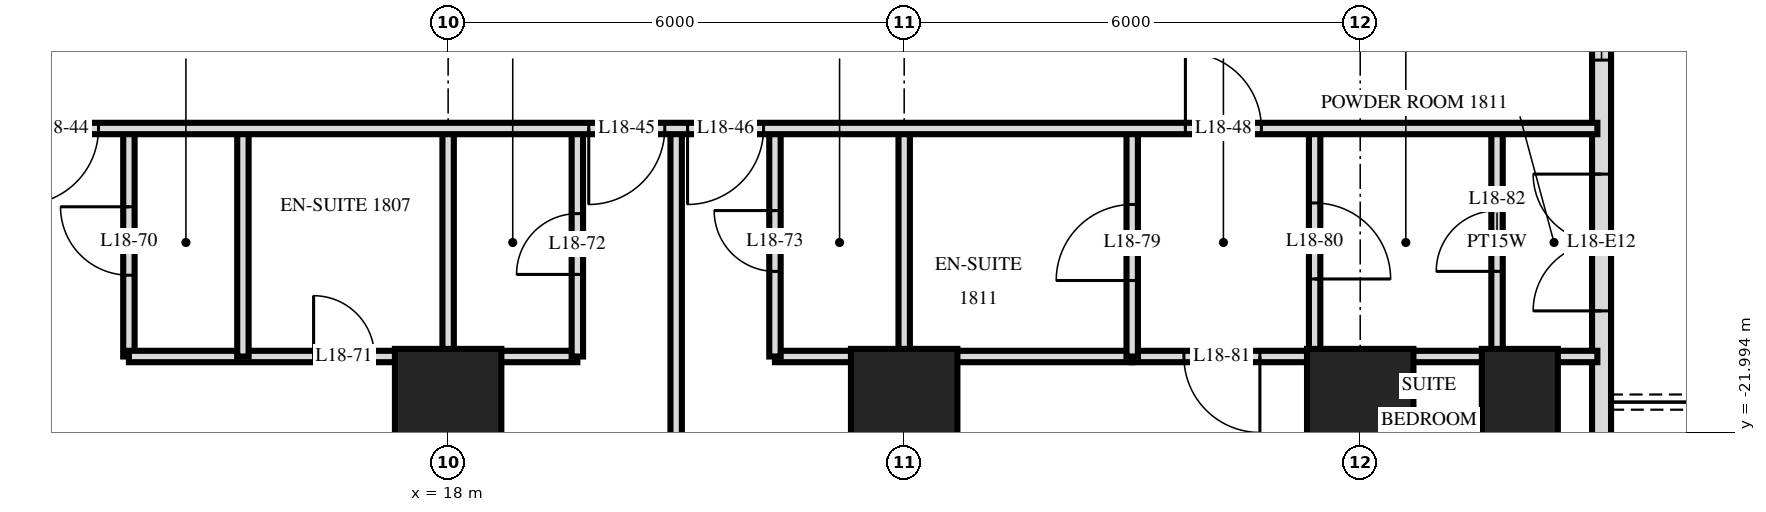
"""IFC4 building model, lengths in metres.
Left out: names, types, materials, properties, quantities, classifications, styles, units other than length and angle.
Written with IfcOpenShell. Run it as: python <this file> out.ifc"""

import sys

from ifc_helpers import new_model, si_unit, direction, frame, frame_2d, origin, origin_2d, place, context, subcontext, project, spatial, rectangle, extrude, element, fill, save


model = new_model("IFC4")
c1 = context("Model", 3, precision=1e-05, world=origin(), true_north=direction((0.0, 1.0)))
c2 = subcontext(c1, "Body", "Model", "MODEL_VIEW")
j1 = project(units=[si_unit("LENGTHUNIT", "METRE"), si_unit("PLANEANGLEUNIT", "RADIAN")], contexts=[c1])
p1 = place(None, origin())
s1 = spatial("IfcSite", under=j1, at=p1, CompositionType="ELEMENT")
p2 = place(p1, origin())
s2 = spatial("IfcBuilding", under=s1, at=p2, CompositionType="ELEMENT")
p3 = place(p2, frame((0.0, 0.0, 74.4)))
s3 = spatial("IfcBuildingStorey", under=s2, at=p3, CompositionType="ELEMENT", Elevation=74.4)
for number, where, z_axis, x_axis in (
    (1, (18.0, -21.6, 0.0), (0.0, 0.0, 1.0), (1.0, 0.0, 0.0)),
    (2, (24.0, -21.6, 0.0), (0.0, 0.0, 1.0), (1.0, 0.0, 0.0)),
    (3, (30.0, -21.6, 0.0), (0.0, 0.0, 1.0), (1.0, 0.0, 0.0)),
):
    element("IfcColumn", number, at=place(p3, frame(where, z_axis=z_axis, x_axis=x_axis)), inside=s3, PredefinedType="COLUMN", context=c2, shape_type="SweptSolid", body=[
        extrude(rectangle(XDim=1.4, YDim=1.4, at=origin_2d()), origin(), (0.0, 0.0, 1.0), 3.6),
    ])
p4 = place(p3, frame((32.1, -21.6, 0.0), z_axis=(0.0, 0.0, 1.0), x_axis=(0.0, 1.0, 0.0)))
e4 = element("IfcColumn", 4, at=p4, inside=s3, PredefinedType="COLUMN", context=c2, shape_type="SweptSolid", body=[
    extrude(rectangle(XDim=1.4, YDim=1.0, at=origin_2d()), origin(), (0.0, 0.0, 1.0), 3.6),
])
p5 = place(p3, frame((33.175, -24.875, 0.0), z_axis=(0.0, 0.0, 1.0), x_axis=(0.0, 1.0, 0.0)))
e5 = element("IfcWall", 5, at=p5, inside=s3, PredefinedType="SOLIDWALL", context=c2, shape_type="SweptSolid", body=[
    extrude(rectangle(XDim=21.551, YDim=0.25, at=frame_2d((10.775, 0.0))), origin(), (0.0, 0.0, 1.0), 3.32),
])
p6 = place(p5, frame((0.575, 0.0, 0.0)))
e6 = element("IfcOpeningElement", 6, at=p6, cuts=e5, PredefinedType="OPENING", context=c2, shape_type="SweptSolid", body=[
    extrude(rectangle(XDim=1.8, YDim=2.4, at=frame_2d((0.9, 1.2))), frame((0.0, 0.135, 0.0), z_axis=(0.0, -1.0, 0.0), x_axis=(1.0, 0.0, 0.0)), (0.0, 0.0, 1.0), 0.27),
])
p7 = place(p5, frame((4.475, 0.0, 0.0)))
e7 = element("IfcOpeningElement", 7, at=p7, cuts=e5, PredefinedType="OPENING", context=c2, shape_type="SweptSolid", body=[
    extrude(rectangle(XDim=1.8, YDim=2.4, at=frame_2d((0.9, 1.2))), frame((0.0, 0.135, 0.0), z_axis=(0.0, -1.0, 0.0), x_axis=(1.0, 0.0, 0.0)), (0.0, 0.0, 1.0), 0.27),
])
p8 = place(p5, frame((7.775, 0.0, 0.3)))
e8 = element("IfcOpeningElement", 8, at=p8, cuts=e5, PredefinedType="OPENING", context=c2, shape_type="SweptSolid", body=[
    extrude(rectangle(XDim=1.2, YDim=2.1, at=frame_2d((0.6, 1.05))), frame((0.0, 0.135, 0.0), z_axis=(0.0, -1.0, 0.0), x_axis=(1.0, 0.0, 0.0)), (0.0, 0.0, 1.0), 0.27),
])
p9 = place(p5, frame((13.1, 0.0, 0.0)))
e9 = element("IfcOpeningElement", 9, at=p9, cuts=e5, PredefinedType="OPENING", context=c2, shape_type="SweptSolid", body=[
    extrude(rectangle(XDim=1.8, YDim=2.4, at=frame_2d((0.9, 1.2))), frame((0.0, 0.135, 0.0), z_axis=(0.0, -1.0, 0.0), x_axis=(1.0, 0.0, 0.0)), (0.0, 0.0, 1.0), 0.27),
])
p10 = place(p3, frame((31.8, -21.0, 0.0), z_axis=(0.0, 0.0, 1.0), x_axis=(0.0, 1.0, 0.0)))
e10 = element("IfcWall", 10, at=p10, inside=s3, PredefinedType="PLUMBINGWALL", context=c2, shape_type="SweptSolid", body=[
    extrude(rectangle(XDim=3.0, YDim=0.15, at=frame_2d((1.5, 0.0))), origin(), (0.0, 0.0, 1.0), 3.32),
])
p11 = place(p10, frame((1.12, 0.0, 0.0)))
e11 = element("IfcOpeningElement", 11, at=p11, cuts=e10, PredefinedType="OPENING", context=c2, shape_type="SweptSolid", body=[
    extrude(rectangle(XDim=0.8, YDim=2.1, at=frame_2d((0.4, 1.05))), frame((0.0, 0.085, 0.0), z_axis=(0.0, -1.0, 0.0), x_axis=(1.0, 0.0, 0.0)), (0.0, 0.0, 1.0), 0.17),
])
p12 = place(p3, frame((30.0, -28.978, 0.0), z_axis=(0.0, 0.0, 1.0), x_axis=(0.0, 1.0, 0.0)))
e12 = element("IfcWall", 12, at=p12, inside=s3, PredefinedType="PARTITIONING", context=c2, shape_type="SweptSolid", body=[
    extrude(rectangle(XDim=7.978, YDim=0.15, at=frame_2d((3.989, 0.0))), origin(), (0.0, 0.0, 1.0), 3.32),
])
p13 = place(p12, frame((3.458, 0.0, 0.0)))
e13 = element("IfcOpeningElement", 13, at=p13, cuts=e12, PredefinedType="OPENING", context=c2, shape_type="SweptSolid", body=[
    extrude(rectangle(XDim=0.9, YDim=2.1, at=frame_2d((0.45, 1.05))), frame((0.0, 0.085, 0.0), z_axis=(0.0, -1.0, 0.0), x_axis=(1.0, 0.0, 0.0)), (0.0, 0.0, 1.0), 0.17),
])
p14 = place(p3, frame((29.4, -21.0, 0.0), z_axis=(0.0, 0.0, 1.0), x_axis=(0.0, 1.0, 0.0)))
e14 = element("IfcWall", 14, at=p14, inside=s3, PredefinedType="PARTITIONING", context=c2, shape_type="SweptSolid", body=[
    extrude(rectangle(XDim=3.0, YDim=0.15, at=frame_2d((1.5, 0.0))), origin(), (0.0, 0.0, 1.0), 3.32),
])
p15 = place(p14, frame((1.02, 0.0, 0.0)))
e15 = element("IfcOpeningElement", 15, at=p15, cuts=e14, PredefinedType="OPENING", context=c2, shape_type="SweptSolid", body=[
    extrude(rectangle(XDim=1.0, YDim=2.1, at=frame_2d((0.5, 1.05))), frame((0.0, 0.085, 0.0), z_axis=(0.0, -1.0, 0.0), x_axis=(1.0, 0.0, 0.0)), (0.0, 0.0, 1.0), 0.17),
])
p16 = place(p3, frame((27.0, -21.0, 0.0), z_axis=(0.0, 0.0, 1.0), x_axis=(0.0, 1.0, 0.0)))
e16 = element("IfcWall", 16, at=p16, inside=s3, PredefinedType="PARTITIONING", context=c2, shape_type="SweptSolid", body=[
    extrude(rectangle(XDim=3.0, YDim=0.15, at=frame_2d((1.5, 0.0))), origin(), (0.0, 0.0, 1.0), 3.32),
])
p17 = place(p16, frame((1.0, 0.0, 0.0)))
e17 = element("IfcOpeningElement", 17, at=p17, cuts=e16, PredefinedType="OPENING", context=c2, shape_type="SweptSolid", body=[
    extrude(rectangle(XDim=1.0, YDim=2.1, at=frame_2d((0.5, 1.05))), frame((0.0, 0.085, 0.0), z_axis=(0.0, -1.0, 0.0), x_axis=(1.0, 0.0, 0.0)), (0.0, 0.0, 1.0), 0.17),
])
p18 = place(p3, frame((24.0, -29.22, 0.0), z_axis=(0.0, 0.0, 1.0), x_axis=(0.0, 1.0, 0.0)))
e18 = element("IfcWall", 18, at=p18, inside=s3, PredefinedType="PARTITIONING", context=c2, shape_type="SweptSolid", body=[
    extrude(rectangle(XDim=11.22, YDim=0.15, at=frame_2d((5.61, 0.0))), origin(), (0.0, 0.0, 1.0), 3.32),
])
p19 = place(p3, frame((22.3, -21.0, 0.0), z_axis=(0.0, 0.0, 1.0), x_axis=(0.0, 1.0, 0.0)))
e19 = element("IfcWall", 19, at=p19, inside=s3, PredefinedType="PARTITIONING", context=c2, shape_type="SweptSolid", body=[
    extrude(rectangle(XDim=3.0, YDim=0.15, at=frame_2d((1.5, 0.0))), origin(), (0.0, 0.0, 1.0), 3.32),
])
p20 = place(p19, frame((1.12, 0.0, 0.0)))
e20 = element("IfcOpeningElement", 20, at=p20, cuts=e19, PredefinedType="OPENING", context=c2, shape_type="SweptSolid", body=[
    extrude(rectangle(XDim=0.8, YDim=2.1, at=frame_2d((0.4, 1.05))), frame((0.0, 0.085, 0.0), z_axis=(0.0, -1.0, 0.0), x_axis=(1.0, 0.0, 0.0)), (0.0, 0.0, 1.0), 0.17),
])
p21 = place(p3, frame((21.0, -29.22, 0.0), z_axis=(0.0, 0.0, 1.0), x_axis=(0.0, 1.0, 0.0)))
e21 = element("IfcWall", 21, at=p21, inside=s3, PredefinedType="PARTITIONING", context=c2, shape_type="SweptSolid", body=[
    extrude(rectangle(XDim=11.22, YDim=0.15, at=frame_2d((5.61, 0.0))), origin(), (0.0, 0.0, 1.0), 3.32),
])
p22 = place(p3, frame((19.7, -21.0, 0.0), z_axis=(0.0, 0.0, 1.0), x_axis=(0.0, 1.0, 0.0)))
e22 = element("IfcWall", 22, at=p22, inside=s3, PredefinedType="PARTITIONING", context=c2, shape_type="SweptSolid", body=[
    extrude(rectangle(XDim=3.0, YDim=0.15, at=frame_2d((1.5, 0.0))), origin(), (0.0, 0.0, 1.0), 3.32),
])
p23 = place(p22, frame((1.08, 0.0, 0.0)))
e23 = element("IfcOpeningElement", 23, at=p23, cuts=e22, PredefinedType="OPENING", context=c2, shape_type="SweptSolid", body=[
    extrude(rectangle(XDim=0.8, YDim=2.1, at=frame_2d((0.4, 1.05))), frame((0.0, 0.085, 0.0), z_axis=(0.0, -1.0, 0.0), x_axis=(1.0, 0.0, 0.0)), (0.0, 0.0, 1.0), 0.17),
])
p24 = place(p3, frame((18.0, -29.22, 0.0), z_axis=(0.0, 0.0, 1.0), x_axis=(0.0, 1.0, 0.0)))
e24 = element("IfcWall", 24, at=p24, inside=s3, PredefinedType="PARTITIONING", context=c2, shape_type="SweptSolid", body=[
    extrude(rectangle(XDim=11.22, YDim=0.15, at=frame_2d((5.61, 0.0))), origin(), (0.0, 0.0, 1.0), 3.32),
])
p25 = place(p3, frame((15.3, -21.0, 0.0), z_axis=(0.0, 0.0, 1.0), x_axis=(0.0, 1.0, 0.0)))
e25 = element("IfcWall", 25, at=p25, inside=s3, PredefinedType="PARTITIONING", context=c2, shape_type="SweptSolid", body=[
    extrude(rectangle(XDim=3.0, YDim=0.15, at=frame_2d((1.5, 0.0))), origin(), (0.0, 0.0, 1.0), 3.32),
])
p26 = place(p3, frame((13.8, -21.0, 0.0), z_axis=(0.0, 0.0, 1.0), x_axis=(0.0, 1.0, 0.0)))
e26 = element("IfcWall", 26, at=p26, inside=s3, PredefinedType="PARTITIONING", context=c2, shape_type="SweptSolid", body=[
    extrude(rectangle(XDim=3.0, YDim=0.15, at=frame_2d((1.5, 0.0))), origin(), (0.0, 0.0, 1.0), 3.32),
])
p27 = place(p26, frame((1.07, 0.0, 0.0)))
e27 = element("IfcOpeningElement", 27, at=p27, cuts=e26, PredefinedType="OPENING", context=c2, shape_type="SweptSolid", body=[
    extrude(rectangle(XDim=0.9, YDim=2.1, at=frame_2d((0.45, 1.05))), frame((0.0, 0.085, 0.0), z_axis=(0.0, -1.0, 0.0), x_axis=(1.0, 0.0, 0.0)), (0.0, 0.0, 1.0), 0.17),
])
p28 = place(p3, frame((27.0, -21.0, 0.0), z_axis=(0.0, 0.0, 1.0), x_axis=(1.0, 0.0, 0.0)))
e28 = element("IfcWall", 28, at=p28, inside=s3, PredefinedType="PARTITIONING", context=c2, shape_type="SweptSolid", body=[
    extrude(rectangle(XDim=2.4, YDim=0.15, at=frame_2d((1.2, 0.0))), origin(), (0.0, 0.0, 1.0), 3.32),
])
p29 = place(p28, frame((0.68, 0.0, 0.0)))
e29 = element("IfcOpeningElement", 29, at=p29, cuts=e28, PredefinedType="OPENING", context=c2, shape_type="SweptSolid", body=[
    extrude(rectangle(XDim=1.0, YDim=2.1, at=frame_2d((0.5, 1.05))), frame((0.0, 0.085, 0.0), z_axis=(0.0, -1.0, 0.0), x_axis=(1.0, 0.0, 0.0)), (0.0, 0.0, 1.0), 0.17),
])
p30 = place(p3, frame((13.8, -21.0, 0.0), z_axis=(0.0, 0.0, 1.0), x_axis=(1.0, 0.0, 0.0)))
e30 = element("IfcWall", 30, at=p30, inside=s3, PredefinedType="PARTITIONING", context=c2, shape_type="SweptSolid", body=[
    extrude(rectangle(XDim=5.9, YDim=0.15, at=frame_2d((2.95, 0.0))), origin(), (0.0, 0.0, 1.0), 3.32),
])
p31 = place(p30, frame((2.43, 0.0, 0.0)))
e31 = element("IfcOpeningElement", 31, at=p31, cuts=e30, PredefinedType="OPENING", context=c2, shape_type="SweptSolid", body=[
    extrude(rectangle(XDim=0.8, YDim=2.1, at=frame_2d((0.4, 1.05))), frame((0.0, 0.085, 0.0), z_axis=(0.0, -1.0, 0.0), x_axis=(1.0, 0.0, 0.0)), (0.0, 0.0, 1.0), 0.17),
])
p32 = place(p3, frame((22.3, -21.0, 0.0), z_axis=(0.0, 0.0, 1.0), x_axis=(1.0, 0.0, 0.0)))
e32 = element("IfcWall", 32, at=p32, inside=s3, PredefinedType="PARTITIONING", context=c2, shape_type="SweptSolid", body=[
    extrude(rectangle(XDim=4.7, YDim=0.15, at=frame_2d((2.35, 0.0))), origin(), (0.0, 0.0, 1.0), 3.32),
])
p33 = place(p3, frame((29.4, -21.0, 0.0), z_axis=(0.0, 0.0, 1.0), x_axis=(1.0, 0.0, 0.0)))
e33 = element("IfcWall", 33, at=p33, inside=s3, PredefinedType="PARTITIONING", context=c2, shape_type="SweptSolid", body=[
    extrude(rectangle(XDim=2.4, YDim=0.15, at=frame_2d((1.2, 0.0))), origin(), (0.0, 0.0, 1.0), 3.32),
])
p34 = place(p3, frame((31.8, -21.0, 0.0), z_axis=(0.0, 0.0, 1.0), x_axis=(1.0, 0.0, 0.0)))
e34 = element("IfcWall", 34, at=p34, inside=s3, PredefinedType="PLUMBINGWALL", context=c2, shape_type="SweptSolid", body=[
    extrude(rectangle(XDim=1.32, YDim=0.15, at=frame_2d((0.66, 0.0))), origin(), (0.0, 0.0, 1.0), 3.32),
])
p35 = place(p3, frame((-33.12, -18.0, 0.0), z_axis=(0.0, 0.0, 1.0), x_axis=(1.0, 0.0, 0.0)))
e35 = element("IfcWall", 35, at=p35, inside=s3, PredefinedType="PARTITIONING", context=c2, shape_type="SweptSolid", body=[
    extrude(rectangle(XDim=66.24, YDim=0.15, at=frame_2d((33.12, 0.0))), origin(), (0.0, 0.0, 1.0), 3.32),
])
p36 = place(p35, frame((15.27, 0.0, 0.0)))
e36 = element("IfcOpeningElement", 36, at=p36, cuts=e35, PredefinedType="OPENING", context=c2, shape_type="SweptSolid", body=[
    extrude(rectangle(XDim=1.0, YDim=2.1, at=frame_2d((0.5, 1.05))), frame((0.0, 0.085, 0.0), z_axis=(0.0, -1.0, 0.0), x_axis=(1.0, 0.0, 0.0)), (0.0, 0.0, 1.0), 0.17),
])
p37 = place(p35, frame((21.22, 0.0, 0.0)))
e37 = element("IfcOpeningElement", 37, at=p37, cuts=e35, PredefinedType="OPENING", context=c2, shape_type="SweptSolid", body=[
    extrude(rectangle(XDim=1.0, YDim=2.1, at=frame_2d((0.5, 1.05))), frame((0.0, 0.085, 0.0), z_axis=(0.0, -1.0, 0.0), x_axis=(1.0, 0.0, 0.0)), (0.0, 0.0, 1.0), 0.17),
])
p38 = place(p35, frame((24.27, 0.0, 0.0)))
e38 = element("IfcOpeningElement", 38, at=p38, cuts=e35, PredefinedType="OPENING", context=c2, shape_type="SweptSolid", body=[
    extrude(rectangle(XDim=1.0, YDim=2.1, at=frame_2d((0.5, 1.05))), frame((0.0, 0.085, 0.0), z_axis=(0.0, -1.0, 0.0), x_axis=(1.0, 0.0, 0.0)), (0.0, 0.0, 1.0), 0.17),
])
p39 = place(p35, frame((30.97, 0.0, 0.0)))
e39 = element("IfcOpeningElement", 39, at=p39, cuts=e35, PredefinedType="OPENING", context=c2, shape_type="SweptSolid", body=[
    extrude(rectangle(XDim=1.0, YDim=2.1, at=frame_2d((0.5, 1.05))), frame((0.0, 0.085, 0.0), z_axis=(0.0, -1.0, 0.0), x_axis=(1.0, 0.0, 0.0)), (0.0, 0.0, 1.0), 0.17),
])
p40 = place(p35, frame((40.42, 0.0, 0.0)))
e40 = element("IfcOpeningElement", 40, at=p40, cuts=e35, PredefinedType="OPENING", context=c2, shape_type="SweptSolid", body=[
    extrude(rectangle(XDim=1.0, YDim=2.1, at=frame_2d((0.5, 1.05))), frame((0.0, 0.085, 0.0), z_axis=(0.0, -1.0, 0.0), x_axis=(1.0, 0.0, 0.0)), (0.0, 0.0, 1.0), 0.17),
])
p41 = place(p35, frame((43.97, 0.0, 0.0)))
e41 = element("IfcOpeningElement", 41, at=p41, cuts=e35, PredefinedType="OPENING", context=c2, shape_type="SweptSolid", body=[
    extrude(rectangle(XDim=1.0, YDim=2.1, at=frame_2d((0.5, 1.05))), frame((0.0, 0.085, 0.0), z_axis=(0.0, -1.0, 0.0), x_axis=(1.0, 0.0, 0.0)), (0.0, 0.0, 1.0), 0.17),
])
p42 = place(p35, frame((45.52, 0.0, 0.0)))
e42 = element("IfcOpeningElement", 42, at=p42, cuts=e35, PredefinedType="OPENING", context=c2, shape_type="SweptSolid", body=[
    extrude(rectangle(XDim=1.0, YDim=2.1, at=frame_2d((0.5, 1.05))), frame((0.0, 0.085, 0.0), z_axis=(0.0, -1.0, 0.0), x_axis=(1.0, 0.0, 0.0)), (0.0, 0.0, 1.0), 0.17),
])
p43 = place(p35, frame((52.97, 0.0, 0.0)))
e43 = element("IfcOpeningElement", 43, at=p43, cuts=e35, PredefinedType="OPENING", context=c2, shape_type="SweptSolid", body=[
    extrude(rectangle(XDim=1.0, YDim=2.1, at=frame_2d((0.5, 1.05))), frame((0.0, 0.085, 0.0), z_axis=(0.0, -1.0, 0.0), x_axis=(1.0, 0.0, 0.0)), (0.0, 0.0, 1.0), 0.17),
])
p44 = place(p35, frame((54.27, 0.0, 0.0)))
e44 = element("IfcOpeningElement", 44, at=p44, cuts=e35, PredefinedType="OPENING", context=c2, shape_type="SweptSolid", body=[
    extrude(rectangle(XDim=1.0, YDim=2.1, at=frame_2d((0.5, 1.05))), frame((0.0, 0.085, 0.0), z_axis=(0.0, -1.0, 0.0), x_axis=(1.0, 0.0, 0.0)), (0.0, 0.0, 1.0), 0.17),
])
p45 = place(p35, frame((13.42, 0.0, 0.0)))
e45 = element("IfcOpeningElement", 45, at=p45, cuts=e35, PredefinedType="OPENING", context=c2, shape_type="SweptSolid", body=[
    extrude(rectangle(XDim=1.0, YDim=2.1, at=frame_2d((0.5, 1.05))), frame((0.0, 0.085, 0.0), z_axis=(0.0, -1.0, 0.0), x_axis=(1.0, 0.0, 0.0)), (0.0, 0.0, 1.0), 0.17),
])
p46 = place(p35, frame((60.82, 0.0, 0.0)))
e46 = element("IfcOpeningElement", 46, at=p46, cuts=e35, PredefinedType="OPENING", context=c2, shape_type="SweptSolid", body=[
    extrude(rectangle(XDim=1.0, YDim=2.1, at=frame_2d((0.5, 1.05))), frame((0.0, 0.085, 0.0), z_axis=(0.0, -1.0, 0.0), x_axis=(1.0, 0.0, 0.0)), (0.0, 0.0, 1.0), 0.17),
])
p47 = place(p7, origin())
e47 = element("IfcDoor", 47, at=p47, inside=s3, OperationType="DOUBLE_DOOR_SINGLE_SWING", PredefinedType="DOOR", context=c2, shape_type="SweptSolid", body=[
    extrude(rectangle(XDim=1.8, YDim=2.4, at=frame_2d((0.9, 1.2))), frame((0.0, 0.025, 0.0), z_axis=(0.0, -1.0, 0.0), x_axis=(1.0, 0.0, 0.0)), (0.0, 0.0, 1.0), 0.05),
])
fill(e7, e47)
p48 = place(p8, origin())
e48 = element("IfcWindow", 48, at=p48, inside=s3, PartitioningType="SINGLE_PANEL", PredefinedType="WINDOW", context=c2, shape_type="SweptSolid", body=[
    extrude(rectangle(XDim=1.2, YDim=2.1, at=frame_2d((0.6, 1.05))), frame((0.0, 0.03, 0.0), z_axis=(0.0, -1.0, 0.0), x_axis=(1.0, 0.0, 0.0)), (0.0, 0.0, 1.0), 0.06),
])
fill(e8, e48)
p49 = place(p42, frame((0.5, 0.0, 0.0), z_axis=(0.0, 0.0, 1.0), x_axis=(-1.0, 0.0, 0.0)))
e49 = element("IfcDoor", 49, at=p49, inside=s3, OperationType="SINGLE_SWING_LEFT", PredefinedType="DOOR", context=c2, shape_type="SweptSolid", body=[
    extrude(rectangle(XDim=1.0, YDim=2.1, at=frame_2d((0.0, 1.05))), frame((0.0, -0.025, 0.0), z_axis=(0.0, 1.0, 0.0), x_axis=(-1.0, 0.0, 0.0)), (0.0, 0.0, 1.0), 0.05),
])
fill(e42, e49)
p50 = place(p43, frame((0.5, 0.0, 0.0), z_axis=(0.0, 0.0, 1.0), x_axis=(-1.0, 0.0, 0.0)))
e50 = element("IfcDoor", 50, at=p50, inside=s3, OperationType="SINGLE_SWING_LEFT", PredefinedType="DOOR", context=c2, shape_type="SweptSolid", body=[
    extrude(rectangle(XDim=1.0, YDim=2.1, at=frame_2d((0.0, 1.05))), frame((0.0, -0.025, 0.0), z_axis=(0.0, 1.0, 0.0), x_axis=(-1.0, 0.0, 0.0)), (0.0, 0.0, 1.0), 0.05),
])
fill(e43, e50)
p51 = place(p44, frame((0.5, 0.0, 0.0), z_axis=(0.0, 0.0, 1.0), x_axis=(-1.0, 0.0, 0.0)))
e51 = element("IfcDoor", 51, at=p51, inside=s3, OperationType="SINGLE_SWING_LEFT", PredefinedType="DOOR", context=c2, shape_type="SweptSolid", body=[
    extrude(rectangle(XDim=1.0, YDim=2.1, at=frame_2d((0.0, 1.05))), frame((0.0, -0.025, 0.0), z_axis=(0.0, 1.0, 0.0), x_axis=(-1.0, 0.0, 0.0)), (0.0, 0.0, 1.0), 0.05),
])
fill(e44, e51)
p52 = place(p46, origin())
e52 = element("IfcDoor", 52, at=p52, inside=s3, OperationType="SINGLE_SWING_RIGHT", PredefinedType="DOOR", context=c2, shape_type="SweptSolid", body=[
    extrude(rectangle(XDim=1.0, YDim=2.1, at=frame_2d((0.5, 1.05))), frame((0.0, 0.025, 0.0), z_axis=(0.0, -1.0, 0.0), x_axis=(1.0, 0.0, 0.0)), (0.0, 0.0, 1.0), 0.05),
])
fill(e46, e52)
p53 = place(p27, origin())
e53 = element("IfcDoor", 53, at=p53, inside=s3, OperationType="SINGLE_SWING_LEFT", PredefinedType="DOOR", context=c2, shape_type="SweptSolid", body=[
    extrude(rectangle(XDim=0.9, YDim=2.1, at=frame_2d((0.45, 1.05))), frame((0.0, 0.025, 0.0), z_axis=(0.0, -1.0, 0.0), x_axis=(1.0, 0.0, 0.0)), (0.0, 0.0, 1.0), 0.05),
])
fill(e27, e53)
p54 = place(p31, origin())
e54 = element("IfcDoor", 54, at=p54, inside=s3, OperationType="SINGLE_SWING_RIGHT", PredefinedType="DOOR", context=c2, shape_type="SweptSolid", body=[
    extrude(rectangle(XDim=0.8, YDim=2.1, at=frame_2d((0.4, 1.05))), frame((0.0, 0.025, 0.0), z_axis=(0.0, -1.0, 0.0), x_axis=(1.0, 0.0, 0.0)), (0.0, 0.0, 1.0), 0.05),
])
fill(e31, e54)
p55 = place(p23, origin())
e55 = element("IfcDoor", 55, at=p55, inside=s3, OperationType="SINGLE_SWING_RIGHT", PredefinedType="DOOR", context=c2, shape_type="SweptSolid", body=[
    extrude(rectangle(XDim=0.8, YDim=2.1, at=frame_2d((0.4, 1.05))), frame((0.0, 0.025, 0.0), z_axis=(0.0, -1.0, 0.0), x_axis=(1.0, 0.0, 0.0)), (0.0, 0.0, 1.0), 0.05),
])
fill(e23, e55)
p56 = place(p20, origin())
e56 = element("IfcDoor", 56, at=p56, inside=s3, OperationType="SINGLE_SWING_LEFT", PredefinedType="DOOR", context=c2, shape_type="SweptSolid", body=[
    extrude(rectangle(XDim=0.8, YDim=2.1, at=frame_2d((0.4, 1.05))), frame((0.0, 0.025, 0.0), z_axis=(0.0, -1.0, 0.0), x_axis=(1.0, 0.0, 0.0)), (0.0, 0.0, 1.0), 0.05),
])
fill(e20, e56)
p57 = place(p17, origin())
e57 = element("IfcDoor", 57, at=p57, inside=s3, OperationType="SINGLE_SWING_RIGHT", PredefinedType="DOOR", context=c2, shape_type="SweptSolid", body=[
    extrude(rectangle(XDim=1.0, YDim=2.1, at=frame_2d((0.5, 1.05))), frame((0.0, 0.025, 0.0), z_axis=(0.0, -1.0, 0.0), x_axis=(1.0, 0.0, 0.0)), (0.0, 0.0, 1.0), 0.05),
])
fill(e17, e57)
p58 = place(p15, frame((0.5, 0.0, 0.0), z_axis=(0.0, 0.0, 1.0), x_axis=(-1.0, 0.0, 0.0)))
e58 = element("IfcDoor", 58, at=p58, inside=s3, OperationType="SINGLE_SWING_LEFT", PredefinedType="DOOR", context=c2, shape_type="SweptSolid", body=[
    extrude(rectangle(XDim=1.0, YDim=2.1, at=frame_2d((0.0, 1.05))), frame((0.0, -0.025, 0.0), z_axis=(0.0, 1.0, 0.0), x_axis=(-1.0, 0.0, 0.0)), (0.0, 0.0, 1.0), 0.05),
])
fill(e15, e58)
p59 = place(p29, frame((0.5, 0.0, 0.0), z_axis=(0.0, 0.0, 1.0), x_axis=(-1.0, 0.0, 0.0)))
e59 = element("IfcDoor", 59, at=p59, inside=s3, OperationType="SINGLE_SWING_RIGHT", PredefinedType="DOOR", context=c2, shape_type="SweptSolid", body=[
    extrude(rectangle(XDim=1.0, YDim=2.1, at=frame_2d((0.0, 1.05))), frame((0.0, -0.025, 0.0), z_axis=(0.0, 1.0, 0.0), x_axis=(-1.0, 0.0, 0.0)), (0.0, 0.0, 1.0), 0.05),
])
fill(e29, e59)
p60 = place(p11, origin())
e60 = element("IfcDoor", 60, at=p60, inside=s3, OperationType="SINGLE_SWING_RIGHT", PredefinedType="DOOR", context=c2, shape_type="SweptSolid", body=[
    extrude(rectangle(XDim=0.8, YDim=2.1, at=frame_2d((0.4, 1.05))), frame((0.0, 0.025, 0.0), z_axis=(0.0, -1.0, 0.0), x_axis=(1.0, 0.0, 0.0)), (0.0, 0.0, 1.0), 0.05),
])
fill(e11, e60)
save(model, sys.argv[1])
